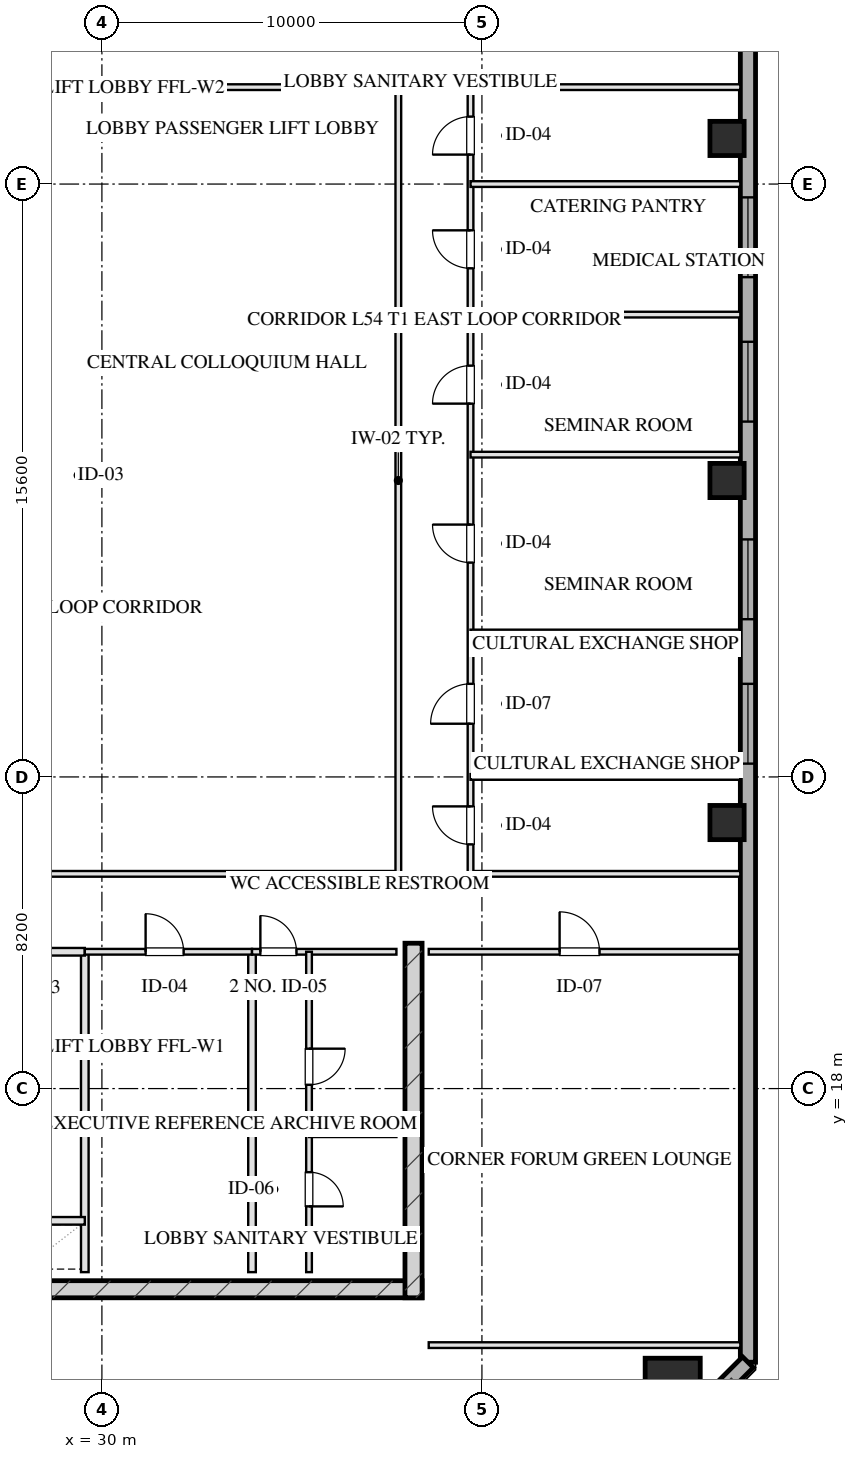
"""IFC4 building model, lengths in metres.
Left out: names, types, materials, properties, quantities, classifications, styles, units other than length and angle.
Written with IfcOpenShell. Run it as: python <this file> out.ifc"""

import sys

from ifc_helpers import new_model, si_unit, direction, frame, frame_2d, origin, origin_2d, place, context, subcontext, project, spatial, rectangle, hollow_rectangle, extrude, element, fill, save


model = new_model("IFC4")
c1 = context("Model", 3, precision=1e-05, world=origin(), true_north=direction((0.0, 1.0)))
c2 = subcontext(c1, "Body", "Model", "MODEL_VIEW")
j1 = project(units=[si_unit("LENGTHUNIT", "METRE"), si_unit("PLANEANGLEUNIT", "RADIAN")], contexts=[c1])
p1 = place(None, origin())
s1 = spatial("IfcSite", under=j1, at=p1, CompositionType="ELEMENT")
p2 = place(p1, origin())
s2 = spatial("IfcBuilding", under=s1, at=p2, CompositionType="ELEMENT")
p3 = place(p2, frame((0.0, 0.0, 202.4)))
s3 = spatial("IfcBuildingStorey", under=s2, at=p3, CompositionType="ELEMENT", Elevation=202.4)
p4 = place(p3, frame((21.575, 12.72, 0.0), z_axis=(0.0, 0.0, 1.0), x_axis=(1.0, 0.0, 0.0)))
e1 = element("IfcWall", 1, at=p4, inside=s3, PredefinedType="SHEAR", context=c2, shape_type="SweptSolid", body=[
    extrude(rectangle(XDim=16.85, YDim=0.45, at=frame_2d((8.425, 0.0))), origin(), (0.0, 0.0, 1.0), 3.45),
])
p5 = place(p3, frame((38.2, 21.825, 0.0), z_axis=(0.0, 0.0, 1.0), x_axis=(0.0, -1.0, 0.0)))
e2 = element("IfcWall", 2, at=p5, inside=s3, PredefinedType="SHEAR", context=c2, shape_type="SweptSolid", body=[
    extrude(rectangle(XDim=9.33, YDim=0.45, at=frame_2d((4.665, 0.0))), origin(), (0.0, 0.0, 1.0), 3.45),
])
p6 = place(p3, frame((45.02, 10.18, 0.0), z_axis=(0.0, 0.0, 1.0), x_axis=(1.0, 0.0, 0.0)))
e3 = element("IfcColumn", 3, at=p6, inside=s3, PredefinedType="COLUMN", context=c2, shape_type="SweptSolid", body=[
    extrude(hollow_rectangle(XDim=1.45, YDim=1.45, WallThickness=0.05, at=origin_2d()), origin(), (0.0, 0.0, 1.0), 3.451),
])
for number, where, z_axis, x_axis in (
    (4, (46.45, 25.0, 0.0), (0.0, 0.0, 1.0), (1.0, 0.0, 0.0)),
    (5, (46.45, 34.0, 0.0), (0.0, 0.0, 1.0), (1.0, 0.0, 0.0)),
    (6, (46.45, 43.0, 0.0), (0.0, 0.0, 1.0), (1.0, 0.0, 0.0)),
):
    element("IfcColumn", number, at=place(p3, frame(where, z_axis=z_axis, x_axis=x_axis)), inside=s3, PredefinedType="COLUMN", context=c2, shape_type="SweptSolid", body=[
        extrude(hollow_rectangle(XDim=0.9, YDim=0.9, WallThickness=0.032, at=origin_2d()), origin(), (0.0, 0.0, 1.0), 3.451),
    ])
p7 = place(p3, frame((47.0, 57.2, 0.0), z_axis=(0.0, 0.0, 1.0), x_axis=(0.0, -1.0, 0.0)))
e7 = element("IfcWall", 7, at=p7, inside=s3, PredefinedType="SOLIDWALL", context=c2, shape_type="SweptSolid", body=[
    extrude(rectangle(XDim=46.4, YDim=0.4, at=frame_2d((23.2, 0.0))), origin(), (0.0, 0.0, 1.0), 2.61),
])
p8 = place(p7, frame((28.55, 0.0, 0.75)))
e8 = element("IfcOpeningElement", 8, at=p8, cuts=e7, PredefinedType="OPENING", context=c2, shape_type="SweptSolid", body=[
    extrude(rectangle(XDim=2.1, YDim=1.46, at=frame_2d((1.05, 0.73))), frame((0.0, 0.21, 0.0), z_axis=(0.0, -1.0, 0.0), x_axis=(1.0, 0.0, 0.0)), (0.0, 0.0, 1.0), 0.42),
])
p9 = place(p7, frame((24.75, 0.0, 0.75)))
e9 = element("IfcOpeningElement", 9, at=p9, cuts=e7, PredefinedType="OPENING", context=c2, shape_type="SweptSolid", body=[
    extrude(rectangle(XDim=2.1, YDim=1.46, at=frame_2d((1.05, 0.73))), frame((0.0, 0.21, 0.0), z_axis=(0.0, -1.0, 0.0), x_axis=(1.0, 0.0, 0.0)), (0.0, 0.0, 1.0), 0.42),
])
p10 = place(p7, frame((19.55, 0.0, 0.75)))
e10 = element("IfcOpeningElement", 10, at=p10, cuts=e7, PredefinedType="OPENING", context=c2, shape_type="SweptSolid", body=[
    extrude(rectangle(XDim=2.1, YDim=1.46, at=frame_2d((1.05, 0.73))), frame((0.0, 0.21, 0.0), z_axis=(0.0, -1.0, 0.0), x_axis=(1.0, 0.0, 0.0)), (0.0, 0.0, 1.0), 0.42),
])
p11 = place(p7, frame((15.75, 0.0, 0.75)))
e11 = element("IfcOpeningElement", 11, at=p11, cuts=e7, PredefinedType="OPENING", context=c2, shape_type="SweptSolid", body=[
    extrude(rectangle(XDim=2.1, YDim=1.46, at=frame_2d((1.05, 0.73))), frame((0.0, 0.21, 0.0), z_axis=(0.0, -1.0, 0.0), x_axis=(1.0, 0.0, 0.0)), (0.0, 0.0, 1.0), 0.42),
])
p12 = place(p3, frame((47.0, 10.8, 0.0), z_axis=(0.0, 0.0, 1.0), x_axis=(-0.707106781187, -0.707106781187, 0.0)))
e12 = element("IfcWall", 12, at=p12, inside=s3, PredefinedType="SOLIDWALL", context=c2, shape_type="SweptSolid", body=[
    extrude(rectangle(XDim=3.677, YDim=0.4, at=frame_2d((1.838, 0.0))), origin(), (0.0, 0.0, 1.0), 2.61),
])
p13 = place(p3, frame((29.55, 21.6, 0.0), z_axis=(0.0, 0.0, 1.0), x_axis=(0.0, -1.0, 0.0)))
e13 = element("IfcWall", 13, at=p13, inside=s3, PredefinedType="PARTITIONING", context=c2, shape_type="SweptSolid", body=[
    extrude(rectangle(XDim=8.43, YDim=0.2, at=frame_2d((4.215, 0.0))), origin(), (0.0, 0.0, 1.0), 3.175),
])
p14 = place(p3, frame((25.72, 21.6, 0.0), z_axis=(0.0, 0.0, 1.0), x_axis=(1.0, 0.0, 0.0)))
e14 = element("IfcWall", 14, at=p14, inside=s3, PredefinedType="PARTITIONING", context=c2, shape_type="SweptSolid", body=[
    extrude(rectangle(XDim=3.83, YDim=0.2, at=frame_2d((1.915, 0.0))), origin(), (0.0, 0.0, 1.0), 3.175),
])
p15 = place(p14, frame((1.35, 0.0, 0.0)))
e15 = element("IfcOpeningElement", 15, at=p15, cuts=e14, PredefinedType="OPENING", context=c2, shape_type="SweptSolid", body=[
    extrude(rectangle(XDim=1.2, YDim=2.05, at=frame_2d((0.6, 1.025))), frame((0.0, 0.11, 0.0), z_axis=(0.0, -1.0, 0.0), x_axis=(1.0, 0.0, 0.0)), (0.0, 0.0, 1.0), 0.22),
])
p16 = place(p3, frame((27.82, 14.52, 0.0), z_axis=(0.0, 0.0, 1.0), x_axis=(1.0, 0.0, 0.0)))
e16 = element("IfcWall", 16, at=p16, inside=s3, PredefinedType="PARTITIONING", context=c2, shape_type="SweptSolid", body=[
    extrude(rectangle(XDim=1.73, YDim=0.2, at=frame_2d((0.865, 0.0))), origin(), (0.0, 0.0, 1.0), 3.175),
])
p17 = place(p3, frame((33.95, 21.6, 0.0), z_axis=(0.0, 0.0, 1.0), x_axis=(0.0, -1.0, 0.0)))
e17 = element("IfcWall", 17, at=p17, inside=s3, PredefinedType="PARTITIONING", context=c2, shape_type="SweptSolid", body=[
    extrude(rectangle(XDim=8.43, YDim=0.2, at=frame_2d((4.215, 0.0))), origin(), (0.0, 0.0, 1.0), 3.175),
])
p18 = place(p3, frame((29.55, 21.6, 0.0), z_axis=(0.0, 0.0, 1.0), x_axis=(1.0, 0.0, 0.0)))
e18 = element("IfcWall", 18, at=p18, inside=s3, PredefinedType="PARTITIONING", context=c2, shape_type="SweptSolid", body=[
    extrude(rectangle(XDim=4.4, YDim=0.15, at=frame_2d((2.2, 0.0))), origin(), (0.0, 0.0, 1.0), 3.175),
])
p19 = place(p18, frame((1.6, 0.0, 0.0)))
e19 = element("IfcOpeningElement", 19, at=p19, cuts=e18, PredefinedType="OPENING", context=c2, shape_type="SweptSolid", body=[
    extrude(rectangle(XDim=1.0, YDim=2.05, at=frame_2d((0.5, 1.025))), frame((0.0, 0.085, 0.0), z_axis=(0.0, -1.0, 0.0), x_axis=(1.0, 0.0, 0.0)), (0.0, 0.0, 1.0), 0.17),
])
p20 = place(p3, frame((33.95, 21.6, 0.0), z_axis=(0.0, 0.0, 1.0), x_axis=(1.0, 0.0, 0.0)))
e20 = element("IfcWall", 20, at=p20, inside=s3, PredefinedType="PARTITIONING", context=c2, shape_type="SweptSolid", body=[
    extrude(rectangle(XDim=3.8, YDim=0.15, at=frame_2d((1.9, 0.0))), origin(), (0.0, 0.0, 1.0), 3.175),
])
p21 = place(p20, frame((0.22, 0.0, 0.0)))
e21 = element("IfcOpeningElement", 21, at=p21, cuts=e20, PredefinedType="OPENING", context=c2, shape_type="SweptSolid", body=[
    extrude(rectangle(XDim=0.95, YDim=2.05, at=frame_2d((0.475, 1.025))), frame((0.0, 0.085, 0.0), z_axis=(0.0, -1.0, 0.0), x_axis=(1.0, 0.0, 0.0)), (0.0, 0.0, 1.0), 0.17),
])
p22 = place(p3, frame((35.45, 21.6, 0.0), z_axis=(0.0, 0.0, 1.0), x_axis=(0.0, -1.0, 0.0)))
e22 = element("IfcWall", 22, at=p22, inside=s3, PredefinedType="PARTITIONING", context=c2, shape_type="SweptSolid", body=[
    extrude(rectangle(XDim=8.43, YDim=0.15, at=frame_2d((4.215, 0.0))), origin(), (0.0, 0.0, 1.0), 2.765),
])
p23 = place(p22, frame((2.55, 0.0, 0.0)))
e23 = element("IfcOpeningElement", 23, at=p23, cuts=e22, PredefinedType="OPENING", context=c2, shape_type="SweptSolid", body=[
    extrude(rectangle(XDim=0.95, YDim=2.05, at=frame_2d((0.475, 1.025))), frame((0.0, 0.085, 0.0), z_axis=(0.0, -1.0, 0.0), x_axis=(1.0, 0.0, 0.0)), (0.0, 0.0, 1.0), 0.17),
])
p24 = place(p22, frame((5.8, 0.0, 0.0)))
e24 = element("IfcOpeningElement", 24, at=p24, cuts=e22, PredefinedType="OPENING", context=c2, shape_type="SweptSolid", body=[
    extrude(rectangle(XDim=0.9, YDim=2.05, at=frame_2d((0.45, 1.025))), frame((0.0, 0.085, 0.0), z_axis=(0.0, -1.0, 0.0), x_axis=(1.0, 0.0, 0.0)), (0.0, 0.0, 1.0), 0.17),
])
p25 = place(p3, frame((35.45, 16.8, 0.0), z_axis=(0.0, 0.0, 1.0), x_axis=(1.0, 0.0, 0.0)))
e25 = element("IfcWall", 25, at=p25, inside=s3, PredefinedType="PARTITIONING", context=c2, shape_type="SweptSolid", body=[
    extrude(rectangle(XDim=2.3, YDim=0.15, at=frame_2d((1.15, 0.0))), origin(), (0.0, 0.0, 1.0), 3.175),
])
p26 = place(p3, frame((38.6, 11.25, 0.0), z_axis=(0.0, 0.0, 1.0), x_axis=(1.0, 0.0, 0.0)))
e26 = element("IfcWall", 26, at=p26, inside=s3, PredefinedType="PARTITIONING", context=c2, shape_type="SweptSolid", body=[
    extrude(rectangle(XDim=8.2, YDim=0.15, at=frame_2d((4.1, 0.0))), origin(), (0.0, 0.0, 1.0), 3.175),
])
p27 = place(p3, frame((38.6, 21.6, 0.0), z_axis=(0.0, 0.0, 1.0), x_axis=(1.0, 0.0, 0.0)))
e27 = element("IfcWall", 27, at=p27, inside=s3, PredefinedType="PARTITIONING", context=c2, shape_type="SweptSolid", body=[
    extrude(rectangle(XDim=8.2, YDim=0.15, at=frame_2d((4.1, 0.0))), origin(), (0.0, 0.0, 1.0), 3.175),
])
p28 = place(p27, frame((3.444, 0.0, 0.0)))
e28 = element("IfcOpeningElement", 28, at=p28, cuts=e27, PredefinedType="OPENING", context=c2, shape_type="SweptSolid", body=[
    extrude(rectangle(XDim=1.05, YDim=2.05, at=frame_2d((0.525, 1.025))), frame((0.0, 0.085, 0.0), z_axis=(0.0, -1.0, 0.0), x_axis=(1.0, 0.0, 0.0)), (0.0, 0.0, 1.0), 0.17),
])
p29 = place(p3, frame((28.45, 23.65, 0.0), z_axis=(0.0, 0.0, 1.0), x_axis=(1.0, 0.0, 0.0)))
e29 = element("IfcWall", 29, at=p29, inside=s3, PredefinedType="PARTITIONING", context=c2, shape_type="SweptSolid", body=[
    extrude(rectangle(XDim=9.35, YDim=0.15, at=frame_2d((4.675, 0.0))), origin(), (0.0, 0.0, 1.0), 3.175),
])
p30 = place(p3, frame((39.7, 23.65, 0.0), z_axis=(0.0, 0.0, 1.0), x_axis=(1.0, 0.0, 0.0)))
e30 = element("IfcWall", 30, at=p30, inside=s3, PredefinedType="PARTITIONING", context=c2, shape_type="SweptSolid", body=[
    extrude(rectangle(XDim=7.1, YDim=0.15, at=frame_2d((3.55, 0.0))), origin(), (0.0, 0.0, 1.0), 3.175),
])
p31 = place(p3, frame((28.45, 44.35, 0.0), z_axis=(0.0, 0.0, 1.0), x_axis=(1.0, 0.0, 0.0)))
e31 = element("IfcWall", 31, at=p31, inside=s3, PredefinedType="PARTITIONING", context=c2, shape_type="SweptSolid", body=[
    extrude(rectangle(XDim=9.35, YDim=0.15, at=frame_2d((4.675, 0.0))), origin(), (0.0, 0.0, 1.0), 3.175),
])
p32 = place(p3, frame((39.7, 44.35, 0.0), z_axis=(0.0, 0.0, 1.0), x_axis=(1.0, 0.0, 0.0)))
e32 = element("IfcWall", 32, at=p32, inside=s3, PredefinedType="PARTITIONING", context=c2, shape_type="SweptSolid", body=[
    extrude(rectangle(XDim=7.1, YDim=0.15, at=frame_2d((3.55, 0.0))), origin(), (0.0, 0.0, 1.0), 3.175),
])
p33 = place(p3, frame((37.8, 23.65, 0.0), z_axis=(0.0, 0.0, 1.0), x_axis=(0.0, 1.0, 0.0)))
e33 = element("IfcWall", 33, at=p33, inside=s3, PredefinedType="PARTITIONING", context=c2, shape_type="SweptSolid", body=[
    extrude(rectangle(XDim=20.7, YDim=0.15, at=frame_2d((10.35, 0.0))), origin(), (0.0, 0.0, 1.0), 3.175),
])
p34 = place(p3, frame((39.7, 23.65, 0.0), z_axis=(0.0, 0.0, 1.0), x_axis=(0.0, 1.0, 0.0)))
e34 = element("IfcWall", 34, at=p34, inside=s3, PredefinedType="PARTITIONING", context=c2, shape_type="SweptSolid", body=[
    extrude(rectangle(XDim=20.7, YDim=0.15, at=frame_2d((10.35, 0.0))), origin(), (0.0, 0.0, 1.0), 3.175),
])
p35 = place(p34, frame((0.775, 0.0, 0.0)))
e35 = element("IfcOpeningElement", 35, at=p35, cuts=e34, PredefinedType="OPENING", context=c2, shape_type="SweptSolid", body=[
    extrude(rectangle(XDim=1.0, YDim=2.05, at=frame_2d((0.5, 1.025))), frame((0.0, 0.085, 0.0), z_axis=(0.0, -1.0, 0.0), x_axis=(1.0, 0.0, 0.0)), (0.0, 0.0, 1.0), 0.17),
])
p36 = place(p34, frame((3.95, 0.0, 0.0)))
e36 = element("IfcOpeningElement", 36, at=p36, cuts=e34, PredefinedType="OPENING", context=c2, shape_type="SweptSolid", body=[
    extrude(rectangle(XDim=1.05, YDim=2.05, at=frame_2d((0.525, 1.025))), frame((0.0, 0.085, 0.0), z_axis=(0.0, -1.0, 0.0), x_axis=(1.0, 0.0, 0.0)), (0.0, 0.0, 1.0), 0.17),
])
p37 = place(p34, frame((8.19, 0.0, 0.0)))
e37 = element("IfcOpeningElement", 37, at=p37, cuts=e34, PredefinedType="OPENING", context=c2, shape_type="SweptSolid", body=[
    extrude(rectangle(XDim=1.0, YDim=2.05, at=frame_2d((0.5, 1.025))), frame((0.0, 0.085, 0.0), z_axis=(0.0, -1.0, 0.0), x_axis=(1.0, 0.0, 0.0)), (0.0, 0.0, 1.0), 0.17),
])
p38 = place(p34, frame((12.373, 0.0, 0.0)))
e38 = element("IfcOpeningElement", 38, at=p38, cuts=e34, PredefinedType="OPENING", context=c2, shape_type="SweptSolid", body=[
    extrude(rectangle(XDim=1.0, YDim=2.05, at=frame_2d((0.5, 1.025))), frame((0.0, 0.085, 0.0), z_axis=(0.0, -1.0, 0.0), x_axis=(1.0, 0.0, 0.0)), (0.0, 0.0, 1.0), 0.17),
])
p39 = place(p34, frame((15.933, 0.0, 0.0)))
e39 = element("IfcOpeningElement", 39, at=p39, cuts=e34, PredefinedType="OPENING", context=c2, shape_type="SweptSolid", body=[
    extrude(rectangle(XDim=1.0, YDim=2.05, at=frame_2d((0.5, 1.025))), frame((0.0, 0.085, 0.0), z_axis=(0.0, -1.0, 0.0), x_axis=(1.0, 0.0, 0.0)), (0.0, 0.0, 1.0), 0.17),
])
p40 = place(p34, frame((18.925, 0.0, 0.0)))
e40 = element("IfcOpeningElement", 40, at=p40, cuts=e34, PredefinedType="OPENING", context=c2, shape_type="SweptSolid", body=[
    extrude(rectangle(XDim=1.0, YDim=2.05, at=frame_2d((0.5, 1.025))), frame((0.0, 0.085, 0.0), z_axis=(0.0, -1.0, 0.0), x_axis=(1.0, 0.0, 0.0)), (0.0, 0.0, 1.0), 0.17),
])
for number, where, z_axis, x_axis in (
    (41, (39.7, 26.2, 0.0), (0.0, 0.0, 1.0), (1.0, 0.0, 0.0)),
    (42, (39.7, 30.0, 0.0), (0.0, 0.0, 1.0), (1.0, 0.0, 0.0)),
    (43, (39.7, 34.68, 0.0), (0.0, 0.0, 1.0), (1.0, 0.0, 0.0)),
    (44, (39.7, 38.365, 0.0), (0.0, 0.0, 1.0), (1.0, 0.0, 0.0)),
    (45, (39.7, 41.8, 0.0), (0.0, 0.0, 1.0), (1.0, 0.0, 0.0)),
):
    element("IfcWall", number, at=place(p3, frame(where, z_axis=z_axis, x_axis=x_axis)), inside=s3, PredefinedType="PARTITIONING", context=c2, shape_type="SweptSolid", body=[
        extrude(rectangle(XDim=7.1, YDim=0.15, at=frame_2d((3.55, 0.0))), origin(), (0.0, 0.0, 1.0), 3.175),
    ])
p41 = place(p8, origin())
e46 = element("IfcWindow", 46, at=p41, inside=s3, PartitioningType="TRIPLE_PANEL_VERTICAL", PredefinedType="WINDOW", context=c2, shape_type="SweptSolid", body=[
    extrude(rectangle(XDim=2.1, YDim=1.46, at=frame_2d((1.05, 0.73))), frame((0.0, 0.03, 0.0), z_axis=(0.0, -1.0, 0.0), x_axis=(1.0, 0.0, 0.0)), (0.0, 0.0, 1.0), 0.06),
])
fill(e8, e46)
p42 = place(p9, origin())
e47 = element("IfcWindow", 47, at=p42, inside=s3, PartitioningType="TRIPLE_PANEL_VERTICAL", PredefinedType="WINDOW", context=c2, shape_type="SweptSolid", body=[
    extrude(rectangle(XDim=2.1, YDim=1.46, at=frame_2d((1.05, 0.73))), frame((0.0, 0.03, 0.0), z_axis=(0.0, -1.0, 0.0), x_axis=(1.0, 0.0, 0.0)), (0.0, 0.0, 1.0), 0.06),
])
fill(e9, e47)
p43 = place(p10, origin())
e48 = element("IfcWindow", 48, at=p43, inside=s3, PartitioningType="TRIPLE_PANEL_VERTICAL", PredefinedType="WINDOW", context=c2, shape_type="SweptSolid", body=[
    extrude(rectangle(XDim=2.1, YDim=1.46, at=frame_2d((1.05, 0.73))), frame((0.0, 0.03, 0.0), z_axis=(0.0, -1.0, 0.0), x_axis=(1.0, 0.0, 0.0)), (0.0, 0.0, 1.0), 0.06),
])
fill(e10, e48)
p44 = place(p11, origin())
e49 = element("IfcWindow", 49, at=p44, inside=s3, PartitioningType="TRIPLE_PANEL_VERTICAL", PredefinedType="WINDOW", context=c2, shape_type="SweptSolid", body=[
    extrude(rectangle(XDim=2.1, YDim=1.46, at=frame_2d((1.05, 0.73))), frame((0.0, 0.03, 0.0), z_axis=(0.0, -1.0, 0.0), x_axis=(1.0, 0.0, 0.0)), (0.0, 0.0, 1.0), 0.06),
])
fill(e11, e49)
p45 = place(p19, origin())
e50 = element("IfcDoor", 50, at=p45, inside=s3, OperationType="SINGLE_SWING_LEFT", PredefinedType="DOOR", context=c2, shape_type="SweptSolid", body=[
    extrude(rectangle(XDim=1.0, YDim=2.05, at=frame_2d((0.5, 1.025))), frame((0.0, 0.025, 0.0), z_axis=(0.0, -1.0, 0.0), x_axis=(1.0, 0.0, 0.0)), (0.0, 0.0, 1.0), 0.05),
])
fill(e19, e50)
p46 = place(p21, origin())
e51 = element("IfcDoor", 51, at=p46, inside=s3, OperationType="SINGLE_SWING_LEFT", PredefinedType="DOOR", context=c2, shape_type="SweptSolid", body=[
    extrude(rectangle(XDim=0.95, YDim=2.05, at=frame_2d((0.475, 1.025))), frame((0.0, 0.025, 0.0), z_axis=(0.0, -1.0, 0.0), x_axis=(1.0, 0.0, 0.0)), (0.0, 0.0, 1.0), 0.05),
])
fill(e21, e51)
p47 = place(p23, origin())
e52 = element("IfcDoor", 52, at=p47, inside=s3, OperationType="SINGLE_SWING_LEFT", PredefinedType="DOOR", context=c2, shape_type="SweptSolid", body=[
    extrude(rectangle(XDim=0.95, YDim=2.05, at=frame_2d((0.475, 1.025))), frame((0.0, 0.025, 0.0), z_axis=(0.0, -1.0, 0.0), x_axis=(1.0, 0.0, 0.0)), (0.0, 0.0, 1.0), 0.05),
])
fill(e23, e52)
p48 = place(p24, origin())
e53 = element("IfcDoor", 53, at=p48, inside=s3, OperationType="SINGLE_SWING_RIGHT", PredefinedType="DOOR", context=c2, shape_type="SweptSolid", body=[
    extrude(rectangle(XDim=0.9, YDim=2.05, at=frame_2d((0.45, 1.025))), frame((0.0, 0.025, 0.0), z_axis=(0.0, -1.0, 0.0), x_axis=(1.0, 0.0, 0.0)), (0.0, 0.0, 1.0), 0.05),
])
fill(e24, e53)
p49 = place(p28, origin())
e54 = element("IfcDoor", 54, at=p49, inside=s3, OperationType="SINGLE_SWING_LEFT", PredefinedType="DOOR", context=c2, shape_type="SweptSolid", body=[
    extrude(rectangle(XDim=1.05, YDim=2.05, at=frame_2d((0.525, 1.025))), frame((0.0, 0.025, 0.0), z_axis=(0.0, -1.0, 0.0), x_axis=(1.0, 0.0, 0.0)), (0.0, 0.0, 1.0), 0.05),
])
fill(e28, e54)
p50 = place(p35, origin())
e55 = element("IfcDoor", 55, at=p50, inside=s3, OperationType="SINGLE_SWING_RIGHT", PredefinedType="DOOR", context=c2, shape_type="SweptSolid", body=[
    extrude(rectangle(XDim=1.0, YDim=2.05, at=frame_2d((0.5, 1.025))), frame((0.0, 0.025, 0.0), z_axis=(0.0, -1.0, 0.0), x_axis=(1.0, 0.0, 0.0)), (0.0, 0.0, 1.0), 0.05),
])
fill(e35, e55)
p51 = place(p36, origin())
e56 = element("IfcDoor", 56, at=p51, inside=s3, OperationType="SINGLE_SWING_LEFT", PredefinedType="DOOR", context=c2, shape_type="SweptSolid", body=[
    extrude(rectangle(XDim=1.05, YDim=2.05, at=frame_2d((0.525, 1.025))), frame((0.0, 0.025, 0.0), z_axis=(0.0, -1.0, 0.0), x_axis=(1.0, 0.0, 0.0)), (0.0, 0.0, 1.0), 0.05),
])
fill(e36, e56)
p52 = place(p37, origin())
e57 = element("IfcDoor", 57, at=p52, inside=s3, OperationType="SINGLE_SWING_RIGHT", PredefinedType="DOOR", context=c2, shape_type="SweptSolid", body=[
    extrude(rectangle(XDim=1.0, YDim=2.05, at=frame_2d((0.5, 1.025))), frame((0.0, 0.025, 0.0), z_axis=(0.0, -1.0, 0.0), x_axis=(1.0, 0.0, 0.0)), (0.0, 0.0, 1.0), 0.05),
])
fill(e37, e57)
p53 = place(p38, origin())
e58 = element("IfcDoor", 58, at=p53, inside=s3, OperationType="SINGLE_SWING_LEFT", PredefinedType="DOOR", context=c2, shape_type="SweptSolid", body=[
    extrude(rectangle(XDim=1.0, YDim=2.05, at=frame_2d((0.5, 1.025))), frame((0.0, 0.025, 0.0), z_axis=(0.0, -1.0, 0.0), x_axis=(1.0, 0.0, 0.0)), (0.0, 0.0, 1.0), 0.05),
])
fill(e38, e58)
p54 = place(p39, origin())
e59 = element("IfcDoor", 59, at=p54, inside=s3, OperationType="SINGLE_SWING_RIGHT", PredefinedType="DOOR", context=c2, shape_type="SweptSolid", body=[
    extrude(rectangle(XDim=1.0, YDim=2.05, at=frame_2d((0.5, 1.025))), frame((0.0, 0.025, 0.0), z_axis=(0.0, -1.0, 0.0), x_axis=(1.0, 0.0, 0.0)), (0.0, 0.0, 1.0), 0.05),
])
fill(e39, e59)
p55 = place(p40, origin())
e60 = element("IfcDoor", 60, at=p55, inside=s3, OperationType="SINGLE_SWING_LEFT", PredefinedType="DOOR", context=c2, shape_type="SweptSolid", body=[
    extrude(rectangle(XDim=1.0, YDim=2.05, at=frame_2d((0.5, 1.025))), frame((0.0, 0.025, 0.0), z_axis=(0.0, -1.0, 0.0), x_axis=(1.0, 0.0, 0.0)), (0.0, 0.0, 1.0), 0.05),
])
fill(e40, e60)
save(model, sys.argv[1])
